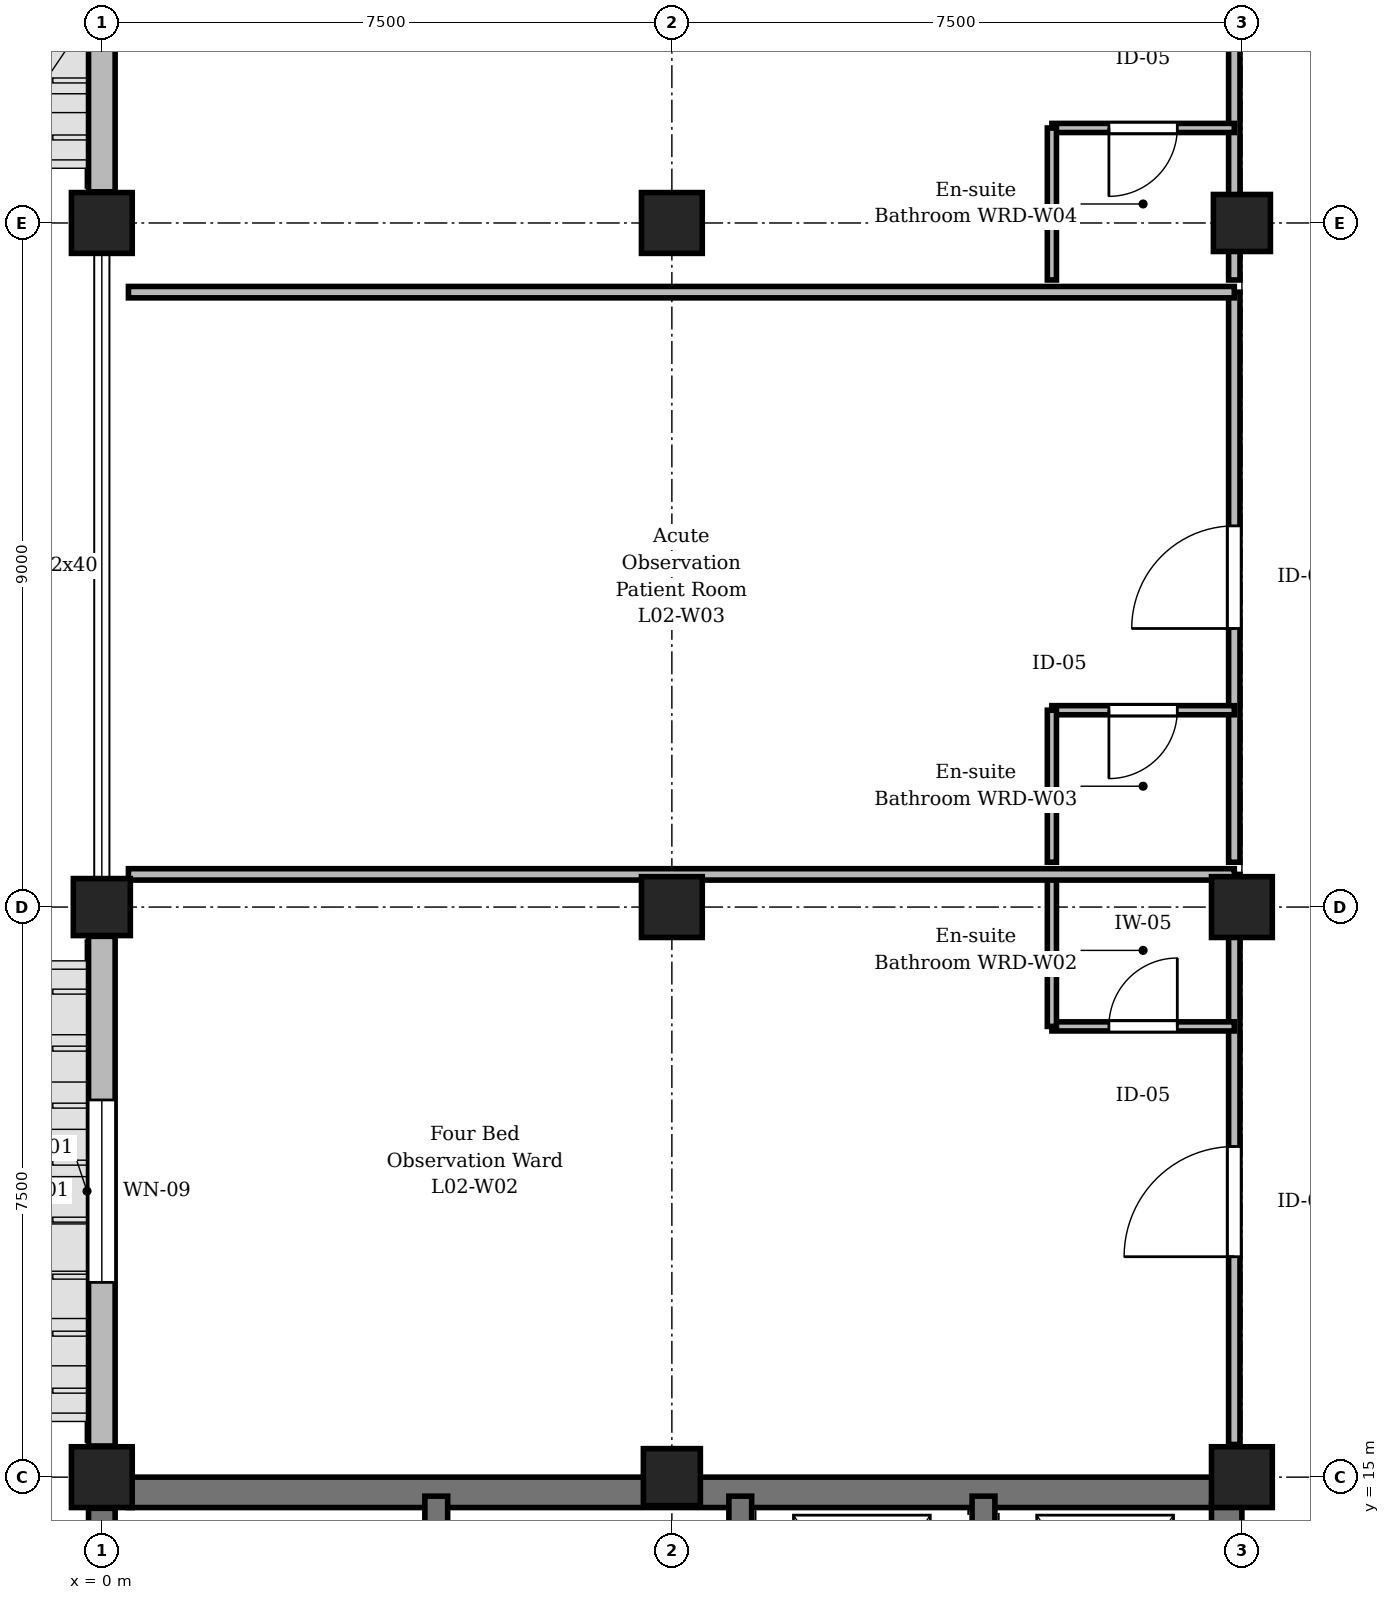
"""IFC4 building model, lengths in metres.
Left out: names, types, materials, properties, quantities, classifications, styles, units other than length and angle.
Written with IfcOpenShell. Run it as: python <this file> out.ifc"""

import sys

from ifc_helpers import new_model, si_unit, direction, frame, frame_2d, origin, origin_2d, place, context, subcontext, project, spatial, rectangle, circle, extrude, element, fill, save


model = new_model("IFC4")
c1 = context("Model", 3, precision=1e-05, world=origin(), true_north=direction((0.0, 1.0)))
c2 = subcontext(c1, "Body", "Model", "MODEL_VIEW")
j1 = project(units=[si_unit("LENGTHUNIT", "METRE"), si_unit("PLANEANGLEUNIT", "RADIAN")], contexts=[c1])
p1 = place(None, origin())
s1 = spatial("IfcSite", under=j1, at=p1, CompositionType="ELEMENT")
p2 = place(p1, origin())
s2 = spatial("IfcBuilding", under=s1, at=p2, CompositionType="ELEMENT")
p3 = place(p2, frame((0.0, 0.0, 9.3)))
s3 = spatial("IfcBuildingStorey", under=s2, at=p3, CompositionType="ELEMENT", Elevation=9.3)
p4 = place(p3, frame((0.0, 15.0, 0.0), z_axis=(0.0, 0.0, 1.0), x_axis=(1.0, 0.0, 0.0)))
e1 = element("IfcColumn", 1, at=p4, inside=s3, PredefinedType="COLUMN", context=c2, shape_type="SweptSolid", body=[
    extrude(rectangle(XDim=0.8, YDim=0.8, at=origin_2d()), origin(), (0.0, 0.0, 1.0), 4.8),
])
p5 = place(p3, frame((0.0, 22.5, 0.0), z_axis=(0.0, 0.0, 1.0), x_axis=(1.0, 0.0, 0.0)))
e2 = element("IfcColumn", 2, at=p5, inside=s3, PredefinedType="COLUMN", context=c2, shape_type="SweptSolid", body=[
    extrude(circle(Radius=0.375, at=origin_2d()), origin(), (0.0, 0.0, 1.0), 4.8),
])
p6 = place(p3, frame((0.0, 31.5, 0.0), z_axis=(0.0, 0.0, 1.0), x_axis=(1.0, 0.0, 0.0)))
e3 = element("IfcColumn", 3, at=p6, inside=s3, PredefinedType="COLUMN", context=c2, shape_type="SweptSolid", body=[
    extrude(rectangle(XDim=0.8, YDim=0.8, at=origin_2d()), origin(), (0.0, 0.0, 1.0), 4.8),
])
p7 = place(p3, frame((7.5, 15.0, 0.0), z_axis=(0.0, 0.0, 1.0), x_axis=(1.0, 0.0, 0.0)))
e4 = element("IfcColumn", 4, at=p7, inside=s3, PredefinedType="COLUMN", context=c2, shape_type="SweptSolid", body=[
    extrude(circle(Radius=0.375, at=origin_2d()), origin(), (0.0, 0.0, 1.0), 4.8),
])
for number, where, z_axis, x_axis in (
    (5, (7.5, 22.5, 0.0), (0.0, 0.0, 1.0), (1.0, 0.0, 0.0)),
    (6, (7.5, 31.5, 0.0), (0.0, 0.0, 1.0), (1.0, 0.0, 0.0)),
    (7, (15.0, 15.0, 0.0), (0.0, 0.0, 1.0), (1.0, 0.0, 0.0)),
    (8, (15.0, 22.5, 0.0), (0.0, 0.0, 1.0), (1.0, 0.0, 0.0)),
):
    element("IfcColumn", number, at=place(p3, frame(where, z_axis=z_axis, x_axis=x_axis)), inside=s3, PredefinedType="COLUMN", context=c2, shape_type="SweptSolid", body=[
        extrude(rectangle(XDim=0.8, YDim=0.8, at=origin_2d()), origin(), (0.0, 0.0, 1.0), 4.8),
    ])
p8 = place(p3, frame((15.0, 31.5, 0.0), z_axis=(0.0, 0.0, 1.0), x_axis=(1.0, 0.0, 0.0)))
e9 = element("IfcColumn", 9, at=p8, inside=s3, PredefinedType="COLUMN", context=c2, shape_type="SweptSolid", body=[
    extrude(circle(Radius=0.375, at=origin_2d()), origin(), (0.0, 0.0, 1.0), 4.8),
])
p9 = place(p3, frame((0.0, 7.91, 0.0), z_axis=(0.0, 0.0, 1.0), x_axis=(0.0, 1.0, 0.0)))
e10 = element("IfcWall", 10, at=p9, inside=s3, PredefinedType="SHEAR", context=c2, shape_type="SweptSolid", body=[
    extrude(rectangle(XDim=6.68, YDim=0.35, at=frame_2d((3.34, 0.0))), origin(), (0.0, 0.0, 1.0), 4.55),
])
p10 = place(p3, frame((0.0, 15.41, 0.0), z_axis=(0.0, 0.0, 1.0), x_axis=(0.0, 1.0, 0.0)))
e11 = element("IfcWall", 11, at=p10, inside=s3, PredefinedType="STANDARD", context=c2, shape_type="SweptSolid", body=[
    extrude(rectangle(XDim=6.705, YDim=0.35, at=frame_2d((3.353, 0.0))), origin(), (0.0, 0.0, 1.0), 3.95),
])
p11 = place(p10, frame((2.153, 0.0, 0.9)))
e12 = element("IfcOpeningElement", 12, at=p11, cuts=e11, PredefinedType="OPENING", context=c2, shape_type="SweptSolid", body=[
    extrude(rectangle(XDim=2.4, YDim=2.1, at=frame_2d((1.2, 1.05))), frame((0.0, 0.185, 0.0), z_axis=(0.0, -1.0, 0.0), x_axis=(1.0, 0.0, 0.0)), (0.0, 0.0, 1.0), 0.37),
])
p12 = place(p3, frame((0.0, 31.91, 0.0), z_axis=(0.0, 0.0, 1.0), x_axis=(0.0, 1.0, 0.0)))
e13 = element("IfcWall", 13, at=p12, inside=s3, PredefinedType="STANDARD", context=c2, shape_type="SweptSolid", body=[
    extrude(rectangle(XDim=6.68, YDim=0.35, at=frame_2d((3.34, 0.0))), origin(), (0.0, 0.0, 1.0), 3.95),
])
p13 = place(p12, frame((2.44, 0.0, 0.9)))
e14 = element("IfcOpeningElement", 14, at=p13, cuts=e13, PredefinedType="OPENING", context=c2, shape_type="SweptSolid", body=[
    extrude(rectangle(XDim=1.8, YDim=1.95, at=frame_2d((0.9, 0.975))), frame((0.0, 0.185, 0.0), z_axis=(0.0, -1.0, 0.0), x_axis=(1.0, 0.0, 0.0)), (0.0, 0.0, 1.0), 0.37),
])
p14 = place(p3, frame((0.35, 14.8, 0.0), z_axis=(0.0, 0.0, 1.0), x_axis=(1.0, 0.0, 0.0)))
e15 = element("IfcWall", 15, at=p14, inside=s3, PredefinedType="SHEAR", context=c2, shape_type="SweptSolid", body=[
    extrude(rectangle(XDim=14.3, YDim=0.4, at=frame_2d((7.15, 0.0))), origin(), (0.0, 0.0, 1.0), 4.55),
])
p15 = place(p3, frame((14.8, 11.6, 0.0), z_axis=(0.0, 0.0, 1.0), x_axis=(0.0, 1.0, 0.0)))
e16 = element("IfcWall", 16, at=p15, inside=s3, PredefinedType="SHEAR", context=c2, shape_type="SweptSolid", body=[
    extrude(rectangle(XDim=3.05, YDim=0.4, at=frame_2d((1.525, 0.0))), origin(), (0.0, 0.0, 1.0), 4.55),
])
for number, where, z_axis, x_axis in (
    (17, (4.4, 11.6, 0.0), (0.0, 0.0, 1.0), (0.0, 1.0, 0.0)),
    (18, (8.4, 11.6, 0.0), (0.0, 0.0, 1.0), (0.0, 1.0, 0.0)),
    (19, (11.6, 11.6, 0.0), (0.0, 0.0, 1.0), (0.0, 1.0, 0.0)),
):
    element("IfcWall", number, at=place(p3, frame(where, z_axis=z_axis, x_axis=x_axis)), inside=s3, PredefinedType="SHEAR", context=c2, shape_type="SweptSolid", body=[
        extrude(rectangle(XDim=3.15, YDim=0.3, at=frame_2d((1.575, 0.0))), origin(), (0.0, 0.0, 1.0), 4.55),
    ])
p16 = place(p3, frame((14.9, 15.43, 0.0), z_axis=(0.0, 0.0, 1.0), x_axis=(0.0, 1.0, 0.0)))
e20 = element("IfcWall", 20, at=p16, inside=s3, PredefinedType="PARTITIONING", context=c2, shape_type="SweptSolid", body=[
    extrude(rectangle(XDim=7.5, YDim=0.15, at=frame_2d((3.75, 0.0))), origin(), (0.0, 0.0, 1.0), 3.835),
])
p17 = place(p16, frame((2.47, 0.0, 0.0)))
e21 = element("IfcOpeningElement", 21, at=p17, cuts=e20, PredefinedType="OPENING", context=c2, shape_type="SweptSolid", body=[
    extrude(rectangle(XDim=1.45, YDim=2.3, at=frame_2d((0.725, 1.15))), frame((0.0, 0.085, 0.0), z_axis=(0.0, -1.0, 0.0), x_axis=(1.0, 0.0, 0.0)), (0.0, 0.0, 1.0), 0.17),
])
p18 = place(p3, frame((12.5, 20.93, 0.0), z_axis=(0.0, 0.0, 1.0), x_axis=(1.0, 0.0, 0.0)))
e22 = element("IfcWall", 22, at=p18, inside=s3, PredefinedType="PARTITIONING", context=c2, shape_type="SweptSolid", body=[
    extrude(rectangle(XDim=2.4, YDim=0.12, at=frame_2d((1.2, 0.0))), origin(), (0.0, 0.0, 1.0), 4.535),
])
p19 = place(p18, frame((0.75, 0.0, 0.0)))
e23 = element("IfcOpeningElement", 23, at=p19, cuts=e22, PredefinedType="OPENING", context=c2, shape_type="SweptSolid", body=[
    extrude(rectangle(XDim=0.9, YDim=2.1, at=frame_2d((0.45, 1.05))), frame((0.0, 0.07, 0.0), z_axis=(0.0, -1.0, 0.0), x_axis=(1.0, 0.0, 0.0)), (0.0, 0.0, 1.0), 0.14),
])
p20 = place(p3, frame((12.5, 20.93, 0.0), z_axis=(0.0, 0.0, 1.0), x_axis=(0.0, 1.0, 0.0)))
e24 = element("IfcWall", 24, at=p20, inside=s3, PredefinedType="PARTITIONING", context=c2, shape_type="SweptSolid", body=[
    extrude(rectangle(XDim=2.0, YDim=0.12, at=frame_2d((1.0, 0.0))), origin(), (0.0, 0.0, 1.0), 4.535),
])
p21 = place(p3, frame((14.9, 23.09, 0.0), z_axis=(0.0, 0.0, 1.0), x_axis=(0.0, 1.0, 0.0)))
e25 = element("IfcWall", 25, at=p21, inside=s3, PredefinedType="PARTITIONING", context=c2, shape_type="SweptSolid", body=[
    extrude(rectangle(XDim=7.5, YDim=0.15, at=frame_2d((3.75, 0.0))), origin(), (0.0, 0.0, 1.0), 3.835),
])
p22 = place(p21, frame((3.075, 0.0, 0.0)))
e26 = element("IfcOpeningElement", 26, at=p22, cuts=e25, PredefinedType="OPENING", context=c2, shape_type="SweptSolid", body=[
    extrude(rectangle(XDim=1.35, YDim=2.25, at=frame_2d((0.675, 1.125))), frame((0.0, 0.085, 0.0), z_axis=(0.0, -1.0, 0.0), x_axis=(1.0, 0.0, 0.0)), (0.0, 0.0, 1.0), 0.17),
])
p23 = place(p3, frame((14.9, 25.09, 0.0), z_axis=(0.0, 0.0, 1.0), x_axis=(-1.0, 0.0, 0.0)))
e27 = element("IfcWall", 27, at=p23, inside=s3, PredefinedType="PARTITIONING", context=c2, shape_type="SweptSolid", body=[
    extrude(rectangle(XDim=2.4, YDim=0.12, at=frame_2d((1.2, 0.0))), origin(), (0.0, 0.0, 1.0), 4.535),
])
p24 = place(p23, frame((0.75, 0.0, 0.0)))
e28 = element("IfcOpeningElement", 28, at=p24, cuts=e27, PredefinedType="OPENING", context=c2, shape_type="SweptSolid", body=[
    extrude(rectangle(XDim=0.9, YDim=2.1, at=frame_2d((0.45, 1.05))), frame((0.0, 0.07, 0.0), z_axis=(0.0, -1.0, 0.0), x_axis=(1.0, 0.0, 0.0)), (0.0, 0.0, 1.0), 0.14),
])
p25 = place(p3, frame((12.5, 23.09, 0.0), z_axis=(0.0, 0.0, 1.0), x_axis=(0.0, 1.0, 0.0)))
e29 = element("IfcWall", 29, at=p25, inside=s3, PredefinedType="PARTITIONING", context=c2, shape_type="SweptSolid", body=[
    extrude(rectangle(XDim=2.0, YDim=0.12, at=frame_2d((1.0, 0.0))), origin(), (0.0, 0.0, 1.0), 4.535),
])
p26 = place(p3, frame((14.9, 30.75, 0.0), z_axis=(0.0, 0.0, 1.0), x_axis=(0.0, 1.0, 0.0)))
e30 = element("IfcWall", 30, at=p26, inside=s3, PredefinedType="PARTITIONING", context=c2, shape_type="SweptSolid", body=[
    extrude(rectangle(XDim=7.5, YDim=0.15, at=frame_2d((3.75, 0.0))), origin(), (0.0, 0.0, 1.0), 3.835),
])
p27 = place(p26, frame((3.58, 0.0, 0.0)))
e31 = element("IfcOpeningElement", 31, at=p27, cuts=e30, PredefinedType="OPENING", context=c2, shape_type="SweptSolid", body=[
    extrude(rectangle(XDim=1.45, YDim=2.3, at=frame_2d((0.725, 1.15))), frame((0.0, 0.085, 0.0), z_axis=(0.0, -1.0, 0.0), x_axis=(1.0, 0.0, 0.0)), (0.0, 0.0, 1.0), 0.17),
])
p28 = place(p3, frame((14.9, 32.75, 0.0), z_axis=(0.0, 0.0, 1.0), x_axis=(-1.0, 0.0, 0.0)))
e32 = element("IfcWall", 32, at=p28, inside=s3, PredefinedType="PARTITIONING", context=c2, shape_type="SweptSolid", body=[
    extrude(rectangle(XDim=2.4, YDim=0.12, at=frame_2d((1.2, 0.0))), origin(), (0.0, 0.0, 1.0), 4.535),
])
p29 = place(p28, frame((0.75, 0.0, 0.0)))
e33 = element("IfcOpeningElement", 33, at=p29, cuts=e32, PredefinedType="OPENING", context=c2, shape_type="SweptSolid", body=[
    extrude(rectangle(XDim=0.9, YDim=2.1, at=frame_2d((0.45, 1.05))), frame((0.0, 0.07, 0.0), z_axis=(0.0, -1.0, 0.0), x_axis=(1.0, 0.0, 0.0)), (0.0, 0.0, 1.0), 0.14),
])
p30 = place(p3, frame((12.5, 30.75, 0.0), z_axis=(0.0, 0.0, 1.0), x_axis=(0.0, 1.0, 0.0)))
e34 = element("IfcWall", 34, at=p30, inside=s3, PredefinedType="PARTITIONING", context=c2, shape_type="SweptSolid", body=[
    extrude(rectangle(XDim=2.0, YDim=0.12, at=frame_2d((1.0, 0.0))), origin(), (0.0, 0.0, 1.0), 4.535),
])
for number, where, z_axis, x_axis in (
    (35, (0.35, 22.93, 0.0), (0.0, 0.0, 1.0), (1.0, 0.0, 0.0)),
    (36, (0.35, 30.59, 0.0), (0.0, 0.0, 1.0), (1.0, 0.0, 0.0)),
):
    element("IfcWall", number, at=place(p3, frame(where, z_axis=z_axis, x_axis=x_axis)), inside=s3, PredefinedType="PARTITIONING", context=c2, shape_type="SweptSolid", body=[
        extrude(rectangle(XDim=14.55, YDim=0.15, at=frame_2d((7.275, 0.0))), origin(), (0.0, 0.0, 1.0), 4.535),
    ])
p31 = place(p11, origin())
e37 = element("IfcWindow", 37, at=p31, inside=s3, PartitioningType="SINGLE_PANEL", PredefinedType="WINDOW", context=c2, shape_type="SweptSolid", body=[
    extrude(rectangle(XDim=2.4, YDim=2.1, at=frame_2d((1.2, 1.05))), frame((0.0, 0.03, 0.0), z_axis=(0.0, -1.0, 0.0), x_axis=(1.0, 0.0, 0.0)), (0.0, 0.0, 1.0), 0.06),
])
fill(e12, e37)
p32 = place(p17, origin())
e38 = element("IfcDoor", 38, at=p32, inside=s3, OperationType="SINGLE_SWING_LEFT", PredefinedType="DOOR", context=c2, shape_type="SweptSolid", body=[
    extrude(rectangle(XDim=1.45, YDim=2.3, at=frame_2d((0.725, 1.15))), frame((0.0, 0.025, 0.0), z_axis=(0.0, -1.0, 0.0), x_axis=(1.0, 0.0, 0.0)), (0.0, 0.0, 1.0), 0.05),
])
fill(e21, e38)
p33 = place(p19, origin())
e39 = element("IfcDoor", 39, at=p33, inside=s3, OperationType="SINGLE_SWING_RIGHT", PredefinedType="DOOR", context=c2, shape_type="SweptSolid", body=[
    extrude(rectangle(XDim=0.9, YDim=2.1, at=frame_2d((0.45, 1.05))), frame((0.0, 0.025, 0.0), z_axis=(0.0, -1.0, 0.0), x_axis=(1.0, 0.0, 0.0)), (0.0, 0.0, 1.0), 0.05),
])
fill(e23, e39)
p34 = place(p22, origin())
e40 = element("IfcDoor", 40, at=p34, inside=s3, OperationType="SINGLE_SWING_LEFT", PredefinedType="DOOR", context=c2, shape_type="SweptSolid", body=[
    extrude(rectangle(XDim=1.35, YDim=2.25, at=frame_2d((0.675, 1.125))), frame((0.0, 0.025, 0.0), z_axis=(0.0, -1.0, 0.0), x_axis=(1.0, 0.0, 0.0)), (0.0, 0.0, 1.0), 0.05),
])
fill(e26, e40)
p35 = place(p24, origin())
e41 = element("IfcDoor", 41, at=p35, inside=s3, OperationType="SINGLE_SWING_RIGHT", PredefinedType="DOOR", context=c2, shape_type="SweptSolid", body=[
    extrude(rectangle(XDim=0.9, YDim=2.1, at=frame_2d((0.45, 1.05))), frame((0.0, 0.025, 0.0), z_axis=(0.0, -1.0, 0.0), x_axis=(1.0, 0.0, 0.0)), (0.0, 0.0, 1.0), 0.05),
])
fill(e28, e41)
p36 = place(p29, origin())
e42 = element("IfcDoor", 42, at=p36, inside=s3, OperationType="SINGLE_SWING_RIGHT", PredefinedType="DOOR", context=c2, shape_type="SweptSolid", body=[
    extrude(rectangle(XDim=0.9, YDim=2.1, at=frame_2d((0.45, 1.05))), frame((0.0, 0.025, 0.0), z_axis=(0.0, -1.0, 0.0), x_axis=(1.0, 0.0, 0.0)), (0.0, 0.0, 1.0), 0.05),
])
fill(e33, e42)
save(model, sys.argv[1])
